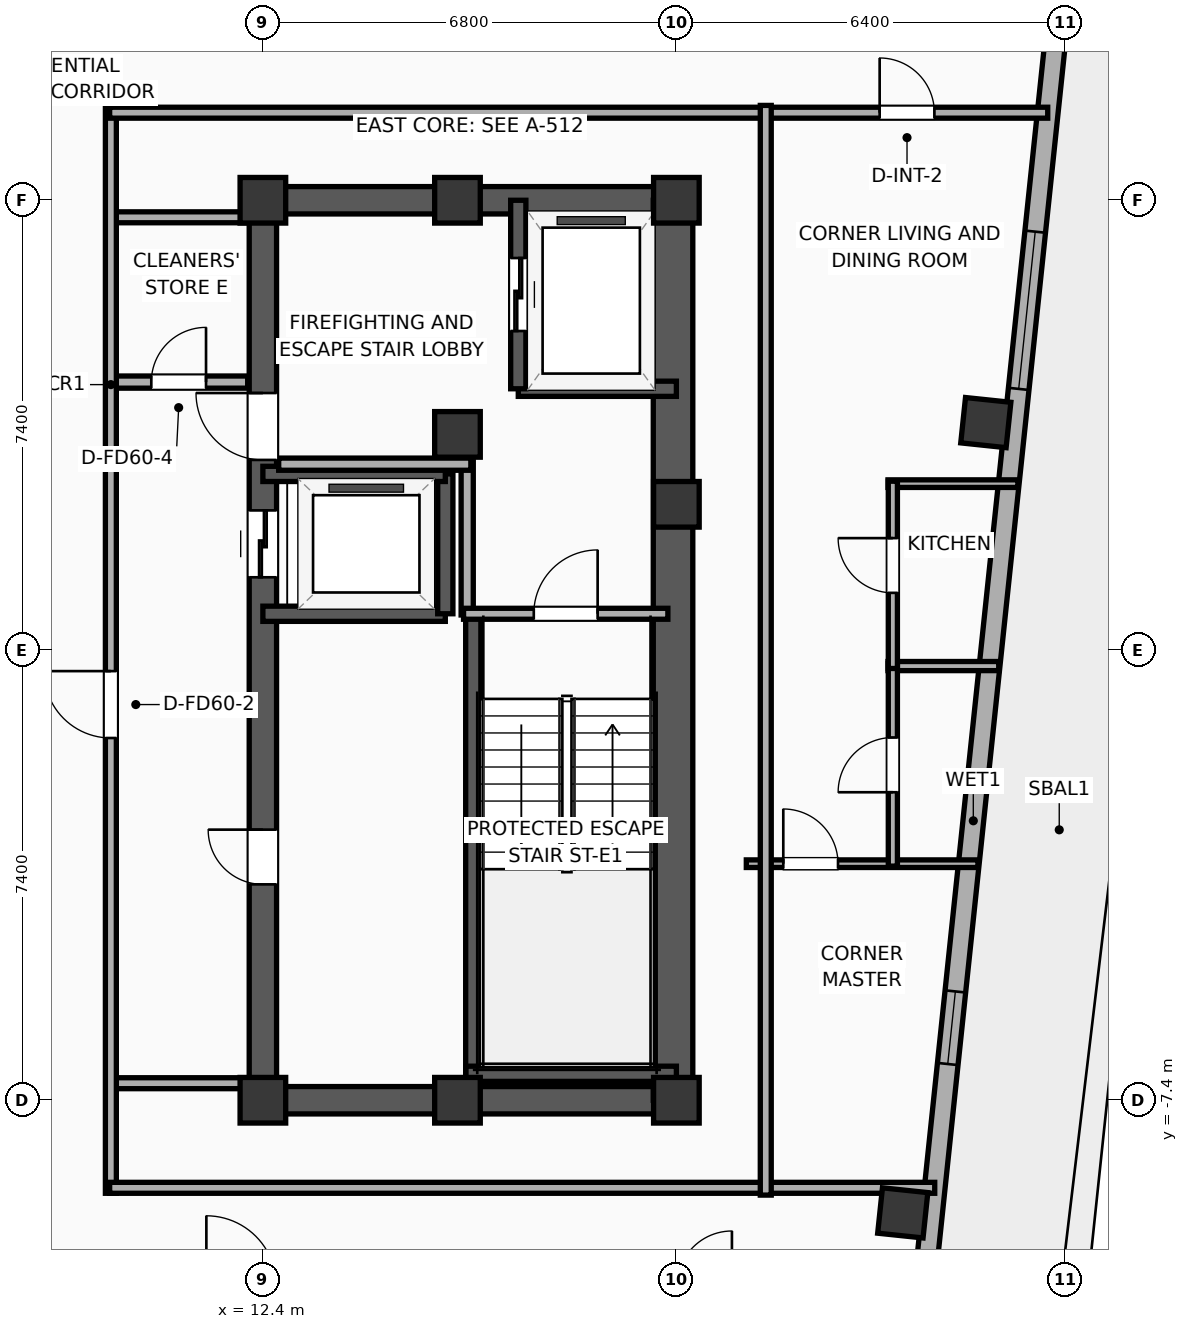
"""IFC4 building model, lengths in metres.
Left out: names, types, materials, properties, quantities, classifications, styles, units other than length and angle.
Written with IfcOpenShell. Run it as: python <this file> out.ifc"""

import sys

from ifc_helpers import new_model, si_unit, direction, frame, frame_2d, origin, origin_2d, place, context, subcontext, project, spatial, rectangle, hollow_rectangle, extrude, element, fill, save


model = new_model("IFC4")
c1 = context("Model", 3, precision=1e-05, world=origin(), true_north=direction((0.0, 1.0)))
c2 = subcontext(c1, "Body", "Model", "MODEL_VIEW")
j1 = project(units=[si_unit("LENGTHUNIT", "METRE"), si_unit("PLANEANGLEUNIT", "RADIAN")], contexts=[c1])
p1 = place(None, origin())
s1 = spatial("IfcSite", under=j1, at=p1, CompositionType="ELEMENT")
p2 = place(p1, origin())
s2 = spatial("IfcBuilding", under=s1, at=p2, CompositionType="ELEMENT")
p3 = place(p2, frame((0.0, 0.0, 291.2)))
s3 = spatial("IfcBuildingStorey", under=s2, at=p3, CompositionType="ELEMENT", Elevation=291.2)
for number, where, z_axis, x_axis in (
    (1, (12.4, -7.4, 0.0), (0.0, 0.0, 1.0), (1.0, 0.0, 0.0)),
    (2, (15.6, 3.55, 0.0), (0.0, 0.0, 1.0), (1.0, 0.0, 0.0)),
    (3, (12.4, 7.4, 0.0), (0.0, 0.0, 1.0), (1.0, 0.0, 0.0)),
    (4, (15.6, -7.4, 0.0), (0.0, 0.0, 1.0), (1.0, 0.0, 0.0)),
    (5, (15.6, 7.4, 0.0), (0.0, 0.0, 1.0), (1.0, 0.0, 0.0)),
    (6, (19.2, -7.4, 0.0), (0.0, 0.0, 1.0), (1.0, 0.0, 0.0)),
    (7, (19.2, 2.4, 0.0), (0.0, 0.0, 1.0), (1.0, 0.0, 0.0)),
    (8, (19.2, 7.4, 0.0), (0.0, 0.0, 1.0), (1.0, 0.0, 0.0)),
):
    element("IfcColumn", number, at=place(p3, frame(where, z_axis=z_axis, x_axis=x_axis)), inside=s3, PredefinedType="COLUMN", context=c2, shape_type="SweptSolid", body=[
        extrude(rectangle(XDim=0.75, YDim=0.75, at=origin_2d()), origin(), (0.0, 0.0, 1.0), 3.9),
    ])
for number, where, z_axis, x_axis in (
    (9, (12.175, -7.4, 0.0), (0.0, 0.0, 1.0), (1.0, 0.0, 0.0)),
    (10, (12.175, 7.4, 0.0), (0.0, 0.0, 1.0), (1.0, 0.0, 0.0)),
):
    element("IfcWall", number, at=place(p3, frame(where, z_axis=z_axis, x_axis=x_axis)), inside=s3, PredefinedType="SHEAR", context=c2, shape_type="SweptSolid", body=[
        extrude(rectangle(XDim=7.25, YDim=0.45, at=frame_2d((3.625, 0.0))), origin(), (0.0, 0.0, 1.0), 3.635),
    ])
p4 = place(p3, frame((12.4, -7.4, 0.0), z_axis=(0.0, 0.0, 1.0), x_axis=(0.0, 1.0, 0.0)))
e11 = element("IfcWall", 11, at=p4, inside=s3, PredefinedType="SHEAR", context=c2, shape_type="SweptSolid", body=[
    extrude(rectangle(XDim=14.8, YDim=0.45, at=frame_2d((7.4, 0.0))), origin(), (0.0, 0.0, 1.0), 3.635),
])
p5 = place(p4, frame((8.6, 0.0, 0.0)))
e12 = element("IfcOpeningElement", 12, at=p5, cuts=e11, PredefinedType="OPENING", context=c2, shape_type="SweptSolid", body=[
    extrude(rectangle(XDim=1.1, YDim=2.05, at=frame_2d((0.55, 1.025))), frame((0.0, 0.235, 0.0), z_axis=(0.0, -1.0, 0.0), x_axis=(1.0, 0.0, 0.0)), (0.0, 0.0, 1.0), 0.47),
])
p6 = place(p4, frame((10.53, 0.0, 0.0)))
e13 = element("IfcOpeningElement", 13, at=p6, cuts=e11, PredefinedType="OPENING", context=c2, shape_type="SweptSolid", body=[
    extrude(rectangle(XDim=1.1, YDim=2.05, at=frame_2d((0.55, 1.025))), frame((0.0, 0.235, 0.0), z_axis=(0.0, -1.0, 0.0), x_axis=(1.0, 0.0, 0.0)), (0.0, 0.0, 1.0), 0.47),
])
p7 = place(p4, frame((3.55, 0.0, 0.0)))
e14 = element("IfcOpeningElement", 14, at=p7, cuts=e11, PredefinedType="OPENING", context=c2, shape_type="SweptSolid", body=[
    extrude(rectangle(XDim=0.9, YDim=2.05, at=frame_2d((0.45, 1.025))), frame((0.0, 0.235, 0.0), z_axis=(0.0, -1.0, 0.0), x_axis=(1.0, 0.0, 0.0)), (0.0, 0.0, 1.0), 0.47),
])
p8 = place(p3, frame((19.145, -7.4, 0.0), z_axis=(0.0, 0.0, 1.0), x_axis=(0.0, 1.0, 0.0)))
e15 = element("IfcWall", 15, at=p8, inside=s3, PredefinedType="SHEAR", context=c2, shape_type="SweptSolid", body=[
    extrude(rectangle(XDim=14.8, YDim=0.65, at=frame_2d((7.4, 0.0))), origin(), (0.0, 0.0, 1.0), 3.635),
])
p9 = place(p3, frame((15.86, -7.085, 0.0), z_axis=(0.0, 0.0, 1.0), x_axis=(0.0, 1.0, 0.0)))
e16 = element("IfcWall", 16, at=p9, inside=s3, PredefinedType="SOLIDWALL", context=c2, shape_type="SweptSolid", body=[
    extrude(rectangle(XDim=7.685, YDim=0.25, at=frame_2d((3.843, 0.0))), origin(), (0.0, 0.0, 1.0), 3.635),
])
p10 = place(p3, frame((15.74, -6.965, 0.0), z_axis=(0.0, 0.0, 1.0), x_axis=(1.0, 0.0, 0.0)))
e17 = element("IfcWall", 17, at=p10, inside=s3, PredefinedType="SOLIDWALL", context=c2, shape_type="SweptSolid", body=[
    extrude(rectangle(XDim=3.46, YDim=0.25, at=frame_2d((1.73, 0.0))), origin(), (0.0, 0.0, 1.0), 3.635),
])
for number, where, z_axis, x_axis in (
    (18, (22.923, -9.252, 0.0), (0.0, 0.0, 1.0), (0.995, -0.105, 0.0)),
    (19, (24.289, 3.744, 0.0), (0.0, 0.0, 1.0), (0.995, -0.105, 0.0)),
):
    element("IfcColumn", number, at=place(p3, frame(where, z_axis=z_axis, x_axis=x_axis)), inside=s3, PredefinedType="COLUMN", context=c2, shape_type="SweptSolid", body=[
        extrude(hollow_rectangle(XDim=0.75, YDim=0.75, WallThickness=0.025, at=origin_2d()), origin(), (0.0, 0.0, 1.0), 3.9),
    ])
p11 = place(p3, frame((25.67, 12.296, 0.0), z_axis=(0.0, 0.0, 1.0), x_axis=(-0.104533282919, -0.994521388791, 0.0)))
e20 = element("IfcWall", 20, at=p11, inside=s3, PredefinedType="ELEMENTEDWALL", context=c2, shape_type="SweptSolid", body=[
    extrude(rectangle(XDim=30.366, YDim=0.34, at=frame_2d((15.183, 0.0))), origin(), (0.0, 0.0, 1.0), 3.635),
])
p12 = place(p11, frame((5.442, 0.0, 0.65)))
e21 = element("IfcOpeningElement", 21, at=p12, cuts=e20, PredefinedType="OPENING", context=c2, shape_type="SweptSolid", body=[
    extrude(rectangle(XDim=2.6, YDim=2.45, at=frame_2d((1.3, 1.225))), frame((0.0, 0.18, 0.0), z_axis=(0.0, -1.0, 0.0), x_axis=(1.0, 0.0, 0.0)), (0.0, 0.0, 1.0), 0.36),
])
p13 = place(p11, frame((18.005, 0.0, 0.75)))
e22 = element("IfcOpeningElement", 22, at=p13, cuts=e20, PredefinedType="OPENING", context=c2, shape_type="SweptSolid", body=[
    extrude(rectangle(XDim=1.2, YDim=2.05, at=frame_2d((0.6, 1.025))), frame((0.0, 0.18, 0.0), z_axis=(0.0, -1.0, 0.0), x_axis=(1.0, 0.0, 0.0)), (0.0, 0.0, 1.0), 0.36),
])
p14 = place(p3, frame((16.6, 4.3, 0.0), z_axis=(0.0, 0.0, 1.0), x_axis=(1.0, 0.0, 0.0)))
e23 = element("IfcWall", 23, at=p14, inside=s3, PredefinedType="SOLIDWALL", context=c2, shape_type="SweptSolid", body=[
    extrude(rectangle(XDim=2.6, YDim=0.25, at=frame_2d((1.3, 0.0))), origin(), (0.0, 0.0, 1.0), 3.635),
])
p15 = place(p3, frame((16.6, 7.4, 0.0), z_axis=(0.0, 0.0, 1.0), x_axis=(0.0, -1.0, 0.0)))
e24 = element("IfcWall", 24, at=p15, inside=s3, PredefinedType="SOLIDWALL", context=c2, shape_type="SweptSolid", body=[
    extrude(rectangle(XDim=3.1, YDim=0.25, at=frame_2d((1.55, 0.0))), origin(), (0.0, 0.0, 1.0), 3.635),
])
p16 = place(p15, frame((0.95, 0.0, 0.0)))
e25 = element("IfcOpeningElement", 25, at=p16, cuts=e24, PredefinedType="OPENING", context=c2, shape_type="SweptSolid", body=[
    extrude(rectangle(XDim=1.2, YDim=2.05, at=frame_2d((0.6, 1.025))), frame((0.0, 0.135, 0.0), z_axis=(0.0, -1.0, 0.0), x_axis=(1.0, 0.0, 0.0)), (0.0, 0.0, 1.0), 0.27),
])
p17 = place(p3, frame((12.4, 0.6, 0.0), z_axis=(0.0, 0.0, 1.0), x_axis=(1.0, 0.0, 0.0)))
e26 = element("IfcWall", 26, at=p17, inside=s3, PredefinedType="SOLIDWALL", context=c2, shape_type="SweptSolid", body=[
    extrude(rectangle(XDim=3.0, YDim=0.25, at=frame_2d((1.5, 0.0))), origin(), (0.0, 0.0, 1.0), 3.635),
])
p18 = place(p3, frame((15.4, 0.6, 0.0), z_axis=(0.0, 0.0, 1.0), x_axis=(0.0, 1.0, 0.0)))
e27 = element("IfcWall", 27, at=p18, inside=s3, PredefinedType="SOLIDWALL", context=c2, shape_type="SweptSolid", body=[
    extrude(rectangle(XDim=2.3, YDim=0.25, at=frame_2d((1.15, 0.0))), origin(), (0.0, 0.0, 1.0), 3.635),
])
p19 = place(p3, frame((15.4, 2.9, 0.0), z_axis=(0.0, 0.0, 1.0), x_axis=(-1.0, 0.0, 0.0)))
e28 = element("IfcWall", 28, at=p19, inside=s3, PredefinedType="SOLIDWALL", context=c2, shape_type="SweptSolid", body=[
    extrude(rectangle(XDim=3.0, YDim=0.25, at=frame_2d((1.5, 0.0))), origin(), (0.0, 0.0, 1.0), 3.635),
])
p20 = place(p3, frame((15.76, 0.58, 0.0), z_axis=(0.0, 0.0, 1.0), x_axis=(0.0, 1.0, 0.0)))
e29 = element("IfcWall", 29, at=p20, inside=s3, PredefinedType="PARTITIONING", context=c2, shape_type="SweptSolid", body=[
    extrude(rectangle(XDim=2.52, YDim=0.2, at=frame_2d((1.26, 0.0))), origin(), (0.0, 0.0, 1.0), 3.635),
])
p21 = place(p3, frame((12.66, 3.06, 0.0), z_axis=(0.0, 0.0, 1.0), x_axis=(1.0, 0.0, 0.0)))
e30 = element("IfcWall", 30, at=p21, inside=s3, PredefinedType="PARTITIONING", context=c2, shape_type="SweptSolid", body=[
    extrude(rectangle(XDim=3.16, YDim=0.2, at=frame_2d((1.58, 0.0))), origin(), (0.0, 0.0, 1.0), 3.635),
])
p22 = place(p3, frame((15.7, 0.6, 0.0), z_axis=(0.0, 0.0, 1.0), x_axis=(1.0, 0.0, 0.0)))
e31 = element("IfcWall", 31, at=p22, inside=s3, PredefinedType="PARTITIONING", context=c2, shape_type="SweptSolid", body=[
    extrude(rectangle(XDim=3.36, YDim=0.18, at=frame_2d((1.68, 0.0))), origin(), (0.0, 0.0, 1.0), 3.635),
])
p23 = place(p22, frame((1.155, 0.0, 0.0)))
e32 = element("IfcOpeningElement", 32, at=p23, cuts=e31, PredefinedType="OPENING", context=c2, shape_type="SweptSolid", body=[
    extrude(rectangle(XDim=1.05, YDim=2.05, at=frame_2d((0.525, 1.025))), frame((0.0, 0.1, 0.0), z_axis=(0.0, -1.0, 0.0), x_axis=(1.0, 0.0, 0.0)), (0.0, 0.0, 1.0), 0.2),
])
p24 = place(p3, frame((9.88, 4.41, 0.0), z_axis=(0.0, 0.0, 1.0), x_axis=(1.0, 0.0, 0.0)))
e33 = element("IfcWall", 33, at=p24, inside=s3, PredefinedType="PARTITIONING", context=c2, shape_type="SweptSolid", body=[
    extrude(rectangle(XDim=2.27, YDim=0.2, at=frame_2d((1.135, 0.0))), origin(), (0.0, 0.0, 1.0), 3.635),
])
p25 = place(p24, frame((0.685, 0.0, 0.0)))
e34 = element("IfcOpeningElement", 34, at=p25, cuts=e33, PredefinedType="OPENING", context=c2, shape_type="SweptSolid", body=[
    extrude(rectangle(XDim=0.9, YDim=2.05, at=frame_2d((0.45, 1.025))), frame((0.0, 0.11, 0.0), z_axis=(0.0, -1.0, 0.0), x_axis=(1.0, 0.0, 0.0)), (0.0, 0.0, 1.0), 0.22),
])
for number, where, z_axis, x_axis in (
    (35, (9.88, 7.12, 0.0), (0.0, 0.0, 1.0), (1.0, 0.0, 0.0)),
    (36, (9.88, -7.12, 0.0), (0.0, 0.0, 1.0), (1.0, 0.0, 0.0)),
):
    element("IfcWall", number, at=place(p3, frame(where, z_axis=z_axis, x_axis=x_axis)), inside=s3, PredefinedType="PARTITIONING", context=c2, shape_type="SweptSolid", body=[
        extrude(rectangle(XDim=2.27, YDim=0.18, at=frame_2d((1.135, 0.0))), origin(), (0.0, 0.0, 1.0), 3.635),
    ])
p26 = place(p3, frame((9.9, -8.93, 0.0), z_axis=(0.0, 0.0, 1.0), x_axis=(0.0, 1.0, 0.0)))
e37 = element("IfcWall", 37, at=p26, inside=s3, PredefinedType="PARTITIONING", context=c2, shape_type="SweptSolid", body=[
    extrude(rectangle(XDim=17.86, YDim=0.18, at=frame_2d((8.93, 0.0))), origin(), (0.0, 0.0, 1.0), 3.635),
])
p27 = place(p26, frame((7.487, 0.0, 0.0)))
e38 = element("IfcOpeningElement", 38, at=p27, cuts=e37, PredefinedType="OPENING", context=c2, shape_type="SweptSolid", body=[
    extrude(rectangle(XDim=1.1, YDim=2.05, at=frame_2d((0.55, 1.025))), frame((0.0, 0.1, 0.0), z_axis=(0.0, -1.0, 0.0), x_axis=(1.0, 0.0, 0.0)), (0.0, 0.0, 1.0), 0.2),
])
p28 = place(p3, frame((9.88, 8.84, 0.0), z_axis=(0.0, 0.0, 1.0), x_axis=(1.0, 0.0, 0.0)))
e39 = element("IfcWall", 39, at=p28, inside=s3, PredefinedType="PARTITIONING", context=c2, shape_type="SweptSolid", body=[
    extrude(rectangle(XDim=15.427, YDim=0.18, at=frame_2d((7.713, 0.0))), origin(), (0.0, 0.0, 1.0), 3.635),
])
p29 = place(p28, frame((12.663, 0.0, 0.0)))
e40 = element("IfcOpeningElement", 40, at=p29, cuts=e39, PredefinedType="OPENING", context=c2, shape_type="SweptSolid", body=[
    extrude(rectangle(XDim=0.9, YDim=2.05, at=frame_2d((0.45, 1.025))), frame((0.0, 0.1, 0.0), z_axis=(0.0, -1.0, 0.0), x_axis=(1.0, 0.0, 0.0)), (0.0, 0.0, 1.0), 0.2),
])
p30 = place(p3, frame((9.88, -8.84, 0.0), z_axis=(0.0, 0.0, 1.0), x_axis=(1.0, 0.0, 0.0)))
e41 = element("IfcWall", 41, at=p30, inside=s3, PredefinedType="PARTITIONING", context=c2, shape_type="SweptSolid", body=[
    extrude(rectangle(XDim=13.569, YDim=0.18, at=frame_2d((6.784, 0.0))), origin(), (0.0, 0.0, 1.0), 3.635),
])
p31 = place(p3, frame((22.68, 2.74, 0.0), z_axis=(0.0, 0.0, 1.0), x_axis=(1.0, 0.0, 0.0)))
e42 = element("IfcWall", 42, at=p31, inside=s3, PredefinedType="PARTITIONING", context=c2, shape_type="SweptSolid", body=[
    extrude(rectangle(XDim=2.137, YDim=0.125, at=frame_2d((1.068, 0.0))), origin(), (0.0, 0.0, 1.0), 3.635),
])
p32 = place(p3, frame((22.68, -0.26, 0.0), z_axis=(0.0, 0.0, 1.0), x_axis=(1.0, 0.0, 0.0)))
e43 = element("IfcWall", 43, at=p32, inside=s3, PredefinedType="PLUMBINGWALL", context=c2, shape_type="SweptSolid", body=[
    extrude(rectangle(XDim=1.821, YDim=0.15, at=frame_2d((0.911, 0.0))), origin(), (0.0, 0.0, 1.0), 3.635),
])
p33 = place(p3, frame((20.35, -3.51, 0.0), z_axis=(0.0, 0.0, 1.0), x_axis=(1.0, 0.0, 0.0)))
e44 = element("IfcWall", 44, at=p33, inside=s3, PredefinedType="PARTITIONING", context=c2, shape_type="SweptSolid", body=[
    extrude(rectangle(XDim=3.81, YDim=0.125, at=frame_2d((1.905, 0.0))), origin(), (0.0, 0.0, 1.0), 3.635),
])
p34 = place(p33, frame((0.608, 0.0, 0.0)))
e45 = element("IfcOpeningElement", 45, at=p34, cuts=e44, PredefinedType="OPENING", context=c2, shape_type="SweptSolid", body=[
    extrude(rectangle(XDim=0.9, YDim=2.05, at=frame_2d((0.45, 1.025))), frame((0.0, 0.073, 0.0), z_axis=(0.0, -1.0, 0.0), x_axis=(1.0, 0.0, 0.0)), (0.0, 0.0, 1.0), 0.145),
])
p35 = place(p3, frame((22.76, -3.55, 0.0), z_axis=(0.0, 0.0, 1.0), x_axis=(0.0, 1.0, 0.0)))
e46 = element("IfcWall", 46, at=p35, inside=s3, PredefinedType="PLUMBINGWALL", context=c2, shape_type="SweptSolid", body=[
    extrude(rectangle(XDim=3.33, YDim=0.15, at=frame_2d((1.665, 0.0))), origin(), (0.0, 0.0, 1.0), 3.635),
])
p36 = place(p35, frame((1.215, 0.0, 0.0)))
e47 = element("IfcOpeningElement", 47, at=p36, cuts=e46, PredefinedType="OPENING", context=c2, shape_type="SweptSolid", body=[
    extrude(rectangle(XDim=0.9, YDim=2.05, at=frame_2d((0.45, 1.025))), frame((0.0, 0.085, 0.0), z_axis=(0.0, -1.0, 0.0), x_axis=(1.0, 0.0, 0.0)), (0.0, 0.0, 1.0), 0.17),
])
p37 = place(p3, frame((22.76, -0.3, 0.0), z_axis=(0.0, 0.0, 1.0), x_axis=(0.0, 1.0, 0.0)))
e48 = element("IfcWall", 48, at=p37, inside=s3, PredefinedType="PLUMBINGWALL", context=c2, shape_type="SweptSolid", body=[
    extrude(rectangle(XDim=3.08, YDim=0.15, at=frame_2d((1.54, 0.0))), origin(), (0.0, 0.0, 1.0), 3.635),
])
p38 = place(p37, frame((1.244, 0.0, 0.0)))
e49 = element("IfcOpeningElement", 49, at=p38, cuts=e48, PredefinedType="OPENING", context=c2, shape_type="SweptSolid", body=[
    extrude(rectangle(XDim=0.9, YDim=2.05, at=frame_2d((0.45, 1.025))), frame((0.0, 0.085, 0.0), z_axis=(0.0, -1.0, 0.0), x_axis=(1.0, 0.0, 0.0)), (0.0, 0.0, 1.0), 0.17),
])
p39 = place(p3, frame((20.67, -8.96, 0.0), z_axis=(0.0, 0.0, 1.0), x_axis=(0.0, 1.0, 0.0)))
e50 = element("IfcWall", 50, at=p39, inside=s3, PredefinedType="PARTITIONING", context=c2, shape_type="SweptSolid", body=[
    extrude(rectangle(XDim=17.92, YDim=0.18, at=frame_2d((8.96, 0.0))), origin(), (0.0, 0.0, 1.0), 3.635),
])
p40 = place(p12, origin())
e51 = element("IfcWindow", 51, at=p40, inside=s3, PartitioningType="SINGLE_PANEL", PredefinedType="WINDOW", context=c2, shape_type="SweptSolid", body=[
    extrude(rectangle(XDim=2.6, YDim=2.45, at=frame_2d((1.3, 1.225))), frame((0.0, 0.03, 0.0), z_axis=(0.0, -1.0, 0.0), x_axis=(1.0, 0.0, 0.0)), (0.0, 0.0, 1.0), 0.06),
])
fill(e21, e51)
p41 = place(p13, origin())
e52 = element("IfcWindow", 52, at=p41, inside=s3, PartitioningType="SINGLE_PANEL", PredefinedType="WINDOW", context=c2, shape_type="SweptSolid", body=[
    extrude(rectangle(XDim=1.2, YDim=2.05, at=frame_2d((0.6, 1.025))), frame((0.0, 0.03, 0.0), z_axis=(0.0, -1.0, 0.0), x_axis=(1.0, 0.0, 0.0)), (0.0, 0.0, 1.0), 0.06),
])
fill(e22, e52)
p42 = place(p16, origin())
e53 = element("IfcDoor", 53, at=p42, inside=s3, OperationType="SLIDING_TO_LEFT", PredefinedType="DOOR", context=c2, shape_type="SweptSolid", body=[
    extrude(rectangle(XDim=1.2, YDim=2.05, at=frame_2d((0.6, 1.025))), frame((0.0, 0.025, 0.0), z_axis=(0.0, -1.0, 0.0), x_axis=(1.0, 0.0, 0.0)), (0.0, 0.0, 1.0), 0.05),
])
fill(e25, e53)
p43 = place(p5, origin())
e54 = element("IfcDoor", 54, at=p43, inside=s3, OperationType="SLIDING_TO_LEFT", PredefinedType="DOOR", context=c2, shape_type="SweptSolid", body=[
    extrude(rectangle(XDim=1.1, YDim=2.05, at=frame_2d((0.55, 1.025))), frame((0.0, 0.025, 0.0), z_axis=(0.0, -1.0, 0.0), x_axis=(1.0, 0.0, 0.0)), (0.0, 0.0, 1.0), 0.05),
])
fill(e12, e54)
p44 = place(p23, origin())
e55 = element("IfcDoor", 55, at=p44, inside=s3, OperationType="SINGLE_SWING_RIGHT", PredefinedType="DOOR", context=c2, shape_type="SweptSolid", body=[
    extrude(rectangle(XDim=1.05, YDim=2.05, at=frame_2d((0.525, 1.025))), frame((0.0, 0.025, 0.0), z_axis=(0.0, -1.0, 0.0), x_axis=(1.0, 0.0, 0.0)), (0.0, 0.0, 1.0), 0.05),
])
fill(e32, e55)
p45 = place(p25, origin())
e56 = element("IfcDoor", 56, at=p45, inside=s3, OperationType="SINGLE_SWING_RIGHT", PredefinedType="DOOR", context=c2, shape_type="SweptSolid", body=[
    extrude(rectangle(XDim=0.9, YDim=2.05, at=frame_2d((0.45, 1.025))), frame((0.0, 0.025, 0.0), z_axis=(0.0, -1.0, 0.0), x_axis=(1.0, 0.0, 0.0)), (0.0, 0.0, 1.0), 0.05),
])
fill(e34, e56)
p46 = place(p27, origin())
e57 = element("IfcDoor", 57, at=p46, inside=s3, OperationType="SINGLE_SWING_RIGHT", PredefinedType="DOOR", context=c2, shape_type="SweptSolid", body=[
    extrude(rectangle(XDim=1.1, YDim=2.05, at=frame_2d((0.55, 1.025))), frame((0.0, 0.025, 0.0), z_axis=(0.0, -1.0, 0.0), x_axis=(1.0, 0.0, 0.0)), (0.0, 0.0, 1.0), 0.05),
])
fill(e38, e57)
p47 = place(p29, origin())
e58 = element("IfcDoor", 58, at=p47, inside=s3, OperationType="SINGLE_SWING_LEFT", PredefinedType="DOOR", context=c2, shape_type="SweptSolid", body=[
    extrude(rectangle(XDim=0.9, YDim=2.05, at=frame_2d((0.45, 1.025))), frame((0.0, 0.025, 0.0), z_axis=(0.0, -1.0, 0.0), x_axis=(1.0, 0.0, 0.0)), (0.0, 0.0, 1.0), 0.05),
])
fill(e40, e58)
p48 = place(p34, origin())
e59 = element("IfcDoor", 59, at=p48, inside=s3, OperationType="SINGLE_SWING_LEFT", PredefinedType="DOOR", context=c2, shape_type="SweptSolid", body=[
    extrude(rectangle(XDim=0.9, YDim=2.05, at=frame_2d((0.45, 1.025))), frame((0.0, 0.025, 0.0), z_axis=(0.0, -1.0, 0.0), x_axis=(1.0, 0.0, 0.0)), (0.0, 0.0, 1.0), 0.05),
])
fill(e45, e59)
p49 = place(p36, origin())
e60 = element("IfcDoor", 60, at=p49, inside=s3, OperationType="SINGLE_SWING_LEFT", PredefinedType="DOOR", context=c2, shape_type="SweptSolid", body=[
    extrude(rectangle(XDim=0.9, YDim=2.05, at=frame_2d((0.45, 1.025))), frame((0.0, 0.025, 0.0), z_axis=(0.0, -1.0, 0.0), x_axis=(1.0, 0.0, 0.0)), (0.0, 0.0, 1.0), 0.05),
])
fill(e47, e60)
p50 = place(p38, origin())
e61 = element("IfcDoor", 61, at=p50, inside=s3, OperationType="SINGLE_SWING_RIGHT", PredefinedType="DOOR", context=c2, shape_type="SweptSolid", body=[
    extrude(rectangle(XDim=0.9, YDim=2.05, at=frame_2d((0.45, 1.025))), frame((0.0, 0.025, 0.0), z_axis=(0.0, -1.0, 0.0), x_axis=(1.0, 0.0, 0.0)), (0.0, 0.0, 1.0), 0.05),
])
fill(e49, e61)
p51 = place(p6, origin())
e62 = element("IfcDoor", 62, at=p51, inside=s3, OperationType="SINGLE_SWING_RIGHT", PredefinedType="DOOR", context=c2, shape_type="SweptSolid", body=[
    extrude(rectangle(XDim=1.1, YDim=2.05, at=frame_2d((0.55, 1.025))), frame((0.0, 0.025, 0.0), z_axis=(0.0, -1.0, 0.0), x_axis=(1.0, 0.0, 0.0)), (0.0, 0.0, 1.0), 0.05),
])
fill(e13, e62)
p52 = place(p7, origin())
e63 = element("IfcDoor", 63, at=p52, inside=s3, OperationType="SINGLE_SWING_RIGHT", PredefinedType="DOOR", context=c2, shape_type="SweptSolid", body=[
    extrude(rectangle(XDim=0.9, YDim=2.05, at=frame_2d((0.45, 1.025))), frame((0.0, 0.025, 0.0), z_axis=(0.0, -1.0, 0.0), x_axis=(1.0, 0.0, 0.0)), (0.0, 0.0, 1.0), 0.05),
])
fill(e14, e63)
save(model, sys.argv[1])
